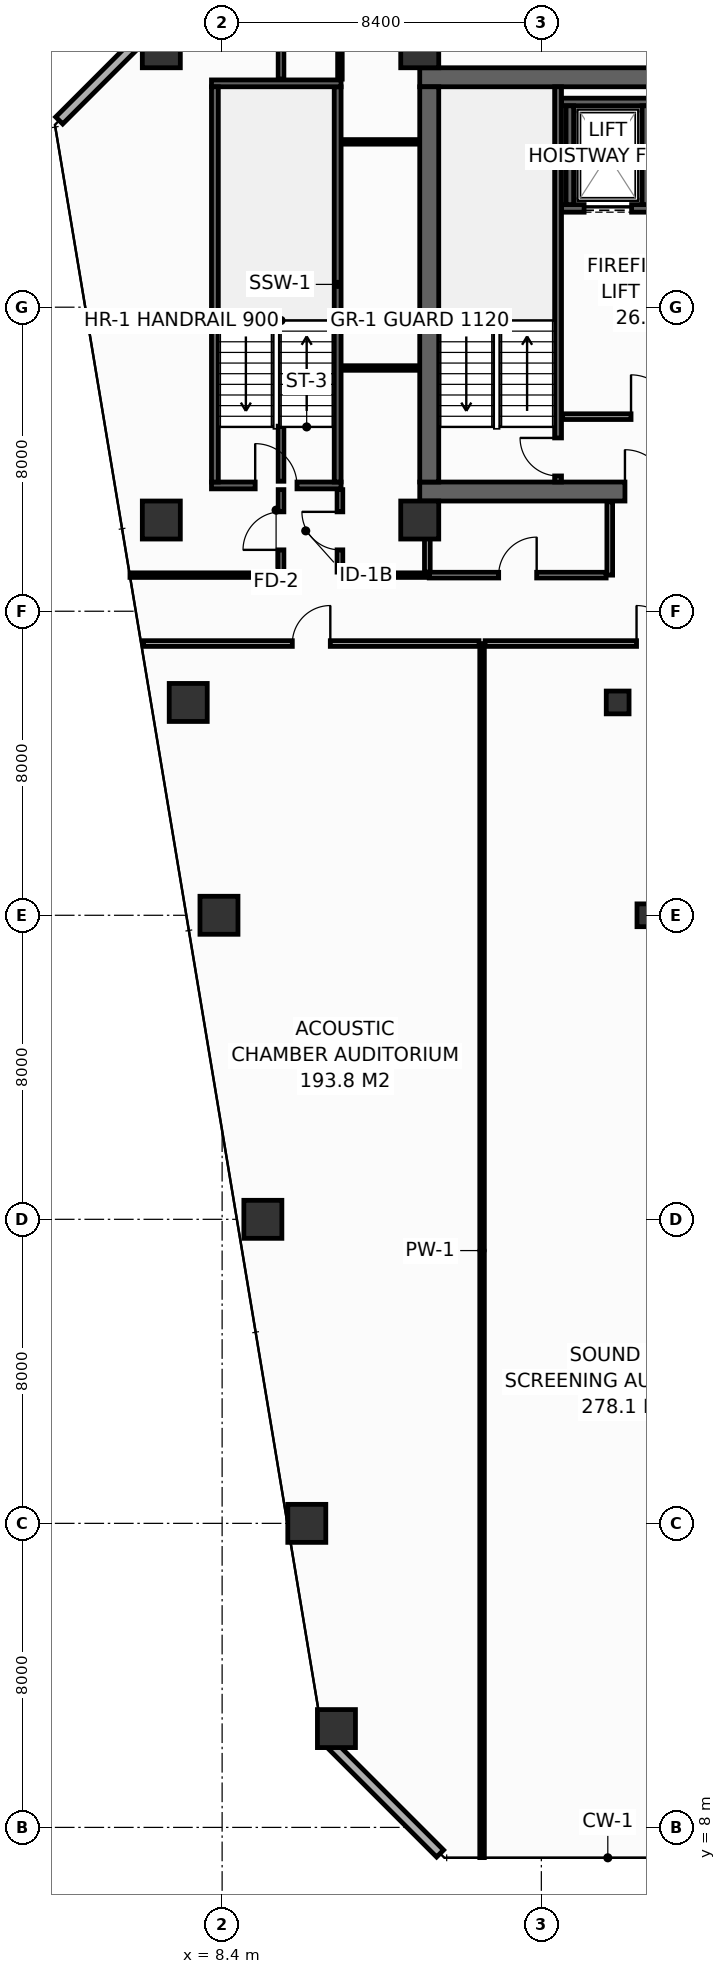
"""IFC4 building model, lengths in metres.
Left out: names, types, materials, properties, quantities, classifications, styles, units other than length and angle.
Written with IfcOpenShell. Run it as: python <this file> out.ifc"""

import sys

from ifc_helpers import new_model, si_unit, direction, frame, frame_2d, origin, origin_2d, place, context, subcontext, project, spatial, rectangle, hollow_rectangle, extrude, element, fill, save


model = new_model("IFC4")
c1 = context("Model", 3, precision=1e-05, world=origin(), true_north=direction((0.0, 1.0)))
c2 = subcontext(c1, "Body", "Model", "MODEL_VIEW")
j1 = project(units=[si_unit("LENGTHUNIT", "METRE"), si_unit("PLANEANGLEUNIT", "RADIAN")], contexts=[c1])
p1 = place(None, origin())
s1 = spatial("IfcSite", under=j1, at=p1, CompositionType="ELEMENT")
p2 = place(p1, origin())
s2 = spatial("IfcBuilding", under=s1, at=p2, CompositionType="ELEMENT")
p3 = place(p2, frame((0.0, 0.0, 141.0)))
s3 = spatial("IfcBuildingStorey", under=s2, at=p3, CompositionType="ELEMENT", Elevation=141.0)
p4 = place(p3, frame((13.6, 43.15, 0.0), z_axis=(0.0, 0.0, 1.0), x_axis=(1.0, 0.0, 0.0)))
e1 = element("IfcWall", 1, at=p4, inside=s3, PredefinedType="SHEAR", context=c2, shape_type="SweptSolid", body=[
    extrude(rectangle(XDim=32.7, YDim=0.5, at=frame_2d((16.35, 0.0))), origin(), (0.0, 0.0, 1.0), 3.55),
])
p5 = place(p4, frame((5.4, 0.0, 0.0)))
e2 = element("IfcOpeningElement", 2, at=p5, cuts=e1, PredefinedType="OPENING", context=c2, shape_type="SweptSolid", body=[
    extrude(rectangle(XDim=1.1, YDim=2.15, at=frame_2d((0.55, 1.075))), frame((0.0, 0.26, 0.0), z_axis=(0.0, -1.0, 0.0), x_axis=(1.0, 0.0, 0.0)), (0.0, 0.0, 1.0), 0.52),
])
p6 = place(p4, frame((25.6, 0.0, 0.0)))
e3 = element("IfcOpeningElement", 3, at=p6, cuts=e1, PredefinedType="OPENING", context=c2, shape_type="SweptSolid", body=[
    extrude(rectangle(XDim=1.1, YDim=2.15, at=frame_2d((0.55, 1.075))), frame((0.0, 0.26, 0.0), z_axis=(0.0, -1.0, 0.0), x_axis=(1.0, 0.0, 0.0)), (0.0, 0.0, 1.0), 0.52),
])
p7 = place(p3, frame((13.6, 54.05, 0.0), z_axis=(0.0, 0.0, 1.0), x_axis=(1.0, 0.0, 0.0)))
e4 = element("IfcWall", 4, at=p7, inside=s3, PredefinedType="SHEAR", context=c2, shape_type="SweptSolid", body=[
    extrude(rectangle(XDim=32.7, YDim=0.5, at=frame_2d((16.35, 0.0))), origin(), (0.0, 0.0, 1.0), 3.55),
])
p8 = place(p3, frame((13.85, 43.4, 0.0), z_axis=(0.0, 0.0, 1.0), x_axis=(0.0, 1.0, 0.0)))
e5 = element("IfcWall", 5, at=p8, inside=s3, PredefinedType="SHEAR", context=c2, shape_type="SweptSolid", body=[
    extrude(rectangle(XDim=10.4, YDim=0.5, at=frame_2d((5.2, 0.0))), origin(), (0.0, 0.0, 1.0), 3.55),
])
for number, where, z_axis, x_axis in (
    (6, (6.8, 54.8, 0.0), (0.0, 0.0, 1.0), (1.0, 0.0, 0.0)),
    (7, (13.6, 54.8, 0.0), (0.0, 0.0, 1.0), (1.0, 0.0, 0.0)),
    (8, (6.8, 42.4, 0.0), (0.0, 0.0, 1.0), (1.0, 0.0, 0.0)),
    (9, (13.6, 42.4, 0.0), (0.0, 0.0, 1.0), (1.0, 0.0, 0.0)),
    (10, (11.408, 10.6, 0.0), (0.0, 0.0, 1.0), (1.0, 0.0, 0.0)),
    (11, (10.628, 16.0, 0.0), (0.0, 0.0, 1.0), (1.0, 0.0, 0.0)),
    (12, (9.472, 24.0, 0.0), (0.0, 0.0, 1.0), (1.0, 0.0, 0.0)),
    (13, (8.317, 32.0, 0.0), (0.0, 0.0, 1.0), (1.0, 0.0, 0.0)),
):
    element("IfcColumn", number, at=place(p3, frame(where, z_axis=z_axis, x_axis=x_axis)), inside=s3, PredefinedType="COLUMN", context=c2, shape_type="SweptSolid", body=[
        extrude(hollow_rectangle(XDim=1.0, YDim=1.0, WallThickness=0.045, at=origin_2d()), origin(), (0.0, 0.0, 1.0), 3.8),
    ])
p9 = place(p3, frame((19.617, 32.0, 0.0), z_axis=(0.0, 0.0, 1.0), x_axis=(1.0, 0.0, 0.0)))
e14 = element("IfcColumn", 14, at=p9, inside=s3, PredefinedType="COLUMN", context=c2, shape_type="SweptSolid", body=[
    extrude(hollow_rectangle(XDim=0.6, YDim=0.6, WallThickness=0.028, at=origin_2d()), origin(), (0.0, 0.0, 1.0), 3.8),
])
p10 = place(p3, frame((7.508, 37.6, 0.0), z_axis=(0.0, 0.0, 1.0), x_axis=(1.0, 0.0, 0.0)))
e15 = element("IfcColumn", 15, at=p10, inside=s3, PredefinedType="COLUMN", context=c2, shape_type="SweptSolid", body=[
    extrude(hollow_rectangle(XDim=1.0, YDim=1.0, WallThickness=0.045, at=origin_2d()), origin(), (0.0, 0.0, 1.0), 3.8),
])
p11 = place(p3, frame((18.808, 37.6, 0.0), z_axis=(0.0, 0.0, 1.0), x_axis=(1.0, 0.0, 0.0)))
e16 = element("IfcColumn", 16, at=p11, inside=s3, PredefinedType="COLUMN", context=c2, shape_type="SweptSolid", body=[
    extrude(hollow_rectangle(XDim=0.6, YDim=0.6, WallThickness=0.028, at=origin_2d()), origin(), (0.0, 0.0, 1.0), 3.8),
])
p12 = place(p3, frame((17.33, 50.6, 0.0), z_axis=(0.0, 0.0, 1.0), x_axis=(1.0, 0.0, 0.0)))
e17 = element("IfcWall", 17, at=p12, inside=s3, PredefinedType="SHEAR", context=c2, shape_type="SweptSolid", body=[
    extrude(rectangle(XDim=2.52, YDim=0.2, at=frame_2d((1.26, 0.0))), origin(), (0.0, 0.0, 1.0), 3.55),
])
p13 = place(p12, frame((0.595, 0.0, 0.0)))
e18 = element("IfcOpeningElement", 18, at=p13, cuts=e17, PredefinedType="OPENING", context=c2, shape_type="SweptSolid", body=[
    extrude(rectangle(XDim=1.25, YDim=2.3, at=frame_2d((0.625, 1.15))), frame((0.0, 0.11, 0.0), z_axis=(0.0, -1.0, 0.0), x_axis=(1.0, 0.0, 0.0)), (0.0, 0.0, 1.0), 0.22),
])
p14 = place(p3, frame((17.33, 53.4, 0.0), z_axis=(0.0, 0.0, 1.0), x_axis=(1.0, 0.0, 0.0)))
e19 = element("IfcWall", 19, at=p14, inside=s3, PredefinedType="SHEAR", context=c2, shape_type="SweptSolid", body=[
    extrude(rectangle(XDim=2.52, YDim=0.2, at=frame_2d((1.26, 0.0))), origin(), (0.0, 0.0, 1.0), 3.55),
])
for number, where, z_axis, x_axis in (
    (20, (17.55, 50.7, 0.0), (0.0, 0.0, 1.0), (0.0, 1.0, 0.0)),
    (21, (19.55, 50.7, 0.0), (0.0, 0.0, 1.0), (0.0, 1.0, 0.0)),
):
    element("IfcWall", number, at=place(p3, frame(where, z_axis=z_axis, x_axis=x_axis)), inside=s3, PredefinedType="SHEAR", context=c2, shape_type="SweptSolid", body=[
        extrude(rectangle(XDim=2.6, YDim=0.2, at=frame_2d((1.3, 0.0))), origin(), (0.0, 0.0, 1.0), 3.55),
    ])
p15 = place(p3, frame((17.24, 43.4, 0.0), z_axis=(0.0, 0.0, 1.0), x_axis=(0.0, 1.0, 0.0)))
e22 = element("IfcWall", 22, at=p15, inside=s3, PredefinedType="SHEAR", context=c2, shape_type="SweptSolid", body=[
    extrude(rectangle(XDim=10.4, YDim=0.18, at=frame_2d((5.2, 0.0))), origin(), (0.0, 0.0, 1.0), 3.55),
])
p16 = place(p15, frame((0.16, 0.0, 0.0)))
e23 = element("IfcOpeningElement", 23, at=p16, cuts=e22, PredefinedType="OPENING", context=c2, shape_type="SweptSolid", body=[
    extrude(rectangle(XDim=1.0, YDim=2.15, at=frame_2d((0.5, 1.075))), frame((0.0, 0.1, 0.0), z_axis=(0.0, -1.0, 0.0), x_axis=(1.0, 0.0, 0.0)), (0.0, 0.0, 1.0), 0.2),
])
p17 = place(p3, frame((8.12, 43.31, 0.0), z_axis=(0.0, 0.0, 1.0), x_axis=(1.0, 0.0, 0.0)))
e24 = element("IfcWall", 24, at=p17, inside=s3, PredefinedType="SHEAR", context=c2, shape_type="SweptSolid", body=[
    extrude(rectangle(XDim=3.41, YDim=0.18, at=frame_2d((1.705, 0.0))), origin(), (0.0, 0.0, 1.0), 3.55),
])
p18 = place(p17, frame((1.15, 0.0, 0.0)))
e25 = element("IfcOpeningElement", 25, at=p18, cuts=e24, PredefinedType="OPENING", context=c2, shape_type="SweptSolid", body=[
    extrude(rectangle(XDim=1.1, YDim=2.15, at=frame_2d((0.55, 1.075))), frame((0.0, 0.1, 0.0), z_axis=(0.0, -1.0, 0.0), x_axis=(1.0, 0.0, 0.0)), (0.0, 0.0, 1.0), 0.2),
])
p19 = place(p3, frame((11.44, 43.4, 0.0), z_axis=(0.0, 0.0, 1.0), x_axis=(0.0, 1.0, 0.0)))
e26 = element("IfcWall", 26, at=p19, inside=s3, PredefinedType="SHEAR", context=c2, shape_type="SweptSolid", body=[
    extrude(rectangle(XDim=10.4, YDim=0.18, at=frame_2d((5.2, 0.0))), origin(), (0.0, 0.0, 1.0), 3.55),
])
p20 = place(p3, frame((11.53, 53.89, 0.0), z_axis=(0.0, 0.0, 1.0), x_axis=(-1.0, 0.0, 0.0)))
e27 = element("IfcWall", 27, at=p20, inside=s3, PredefinedType="SHEAR", context=c2, shape_type="SweptSolid", body=[
    extrude(rectangle(XDim=3.41, YDim=0.18, at=frame_2d((1.705, 0.0))), origin(), (0.0, 0.0, 1.0), 3.55),
])
p21 = place(p3, frame((8.21, 53.8, 0.0), z_axis=(0.0, 0.0, 1.0), x_axis=(0.0, -1.0, 0.0)))
e28 = element("IfcWall", 28, at=p21, inside=s3, PredefinedType="SHEAR", context=c2, shape_type="SweptSolid", body=[
    extrude(rectangle(XDim=10.4, YDim=0.18, at=frame_2d((5.2, 0.0))), origin(), (0.0, 0.0, 1.0), 3.55),
])
p22 = place(p3, frame((17.36, 45.12, 0.0), z_axis=(0.0, 0.0, 1.0), x_axis=(1.0, 0.0, 0.0)))
e29 = element("IfcWall", 29, at=p22, inside=s3, PredefinedType="PARTITIONING", context=c2, shape_type="SweptSolid", body=[
    extrude(rectangle(XDim=5.14, YDim=0.15, at=frame_2d((2.57, 0.0))), origin(), (0.0, 0.0, 1.0), 3.55),
])
p23 = place(p22, frame((1.8, 0.0, 0.0)))
e30 = element("IfcOpeningElement", 30, at=p23, cuts=e29, PredefinedType="OPENING", context=c2, shape_type="SweptSolid", body=[
    extrude(rectangle(XDim=1.1, YDim=2.15, at=frame_2d((0.55, 1.075))), frame((0.0, 0.085, 0.0), z_axis=(0.0, -1.0, 0.0), x_axis=(1.0, 0.0, 0.0)), (0.0, 0.0, 1.0), 0.17),
])
p24 = place(p3, frame((11.162, 10.287, 0.0), z_axis=(0.0, 0.0, 1.0), x_axis=(0.70707775441, -0.707135806771, 0.0)))
e31 = element("IfcWall", 31, at=p24, inside=s3, PredefinedType="STANDARD", context=c2, shape_type="SweptSolid", body=[
    extrude(rectangle(XDim=4.206, YDim=0.26, at=frame_2d((2.103, 0.0))), origin(), (0.0, 0.0, 1.0), 3.55),
])
p25 = place(p3, frame((7.087, 55.887, 0.0), z_axis=(0.0, 0.0, 1.0), x_axis=(-0.707106781187, -0.707106781187, 0.0)))
e32 = element("IfcWall", 32, at=p25, inside=s3, PredefinedType="STANDARD", context=c2, shape_type="SweptSolid", body=[
    extrude(rectangle(XDim=4.206, YDim=0.26, at=frame_2d((2.103, 0.0))), origin(), (0.0, 0.0, 1.0), 3.55),
])
p26 = place(p3, frame((5.975, 40.95, 0.0), z_axis=(0.0, 0.0, 1.0), x_axis=(1.0, 0.0, 0.0)))
e33 = element("IfcWall", 33, at=p26, inside=s3, PredefinedType="PARTITIONING", context=c2, shape_type="SweptSolid", body=[
    extrude(rectangle(XDim=3.975, YDim=0.12, at=frame_2d((1.987, 0.0))), origin(), (0.0, 0.0, 1.0), 3.035),
])
p27 = place(p3, frame((11.5, 40.95, 0.0), z_axis=(0.0, 0.0, 1.0), x_axis=(1.0, 0.0, 0.0)))
e34 = element("IfcWall", 34, at=p27, inside=s3, PredefinedType="PARTITIONING", context=c2, shape_type="SweptSolid", body=[
    extrude(rectangle(XDim=2.35, YDim=0.12, at=frame_2d((1.175, 0.0))), origin(), (0.0, 0.0, 1.0), 3.55),
])
p28 = place(p3, frame((11.55, 52.35, 0.0), z_axis=(0.0, 0.0, 1.0), x_axis=(1.0, 0.0, 0.0)))
e35 = element("IfcWall", 35, at=p28, inside=s3, PredefinedType="PARTITIONING", context=c2, shape_type="SweptSolid", body=[
    extrude(rectangle(XDim=2.03, YDim=0.12, at=frame_2d((1.015, 0.0))), origin(), (0.0, 0.0, 1.0), 3.55),
])
p29 = place(p3, frame((11.5, 54.0, 0.0), z_axis=(0.0, 0.0, 1.0), x_axis=(0.0, 1.0, 0.0)))
e36 = element("IfcWall", 36, at=p29, inside=s3, PredefinedType="PARTITIONING", context=c2, shape_type="SweptSolid", body=[
    extrude(rectangle(XDim=1.995, YDim=0.12, at=frame_2d((0.998, 0.0))), origin(), (0.0, 0.0, 1.0), 2.935),
])
p30 = place(p3, frame((4.87, 47.6, 0.0), z_axis=(0.0, 0.0, 1.0), x_axis=(1.0, 0.0, 0.0)))
e37 = element("IfcWall", 37, at=p30, inside=s3, PredefinedType="PARTITIONING", context=c2, shape_type="SweptSolid", body=[
    extrude(rectangle(XDim=3.23, YDim=0.12, at=frame_2d((1.615, 0.0))), origin(), (0.0, 0.0, 1.0), 2.835),
])
p31 = place(p3, frame((9.95, 41.03, 0.0), z_axis=(0.0, 0.0, 1.0), x_axis=(0.0, 1.0, 0.0)))
e38 = element("IfcWall", 38, at=p31, inside=s3, PredefinedType="PARTITIONING", context=c2, shape_type="SweptSolid", body=[
    extrude(rectangle(XDim=2.17, YDim=0.15, at=frame_2d((1.085, 0.0))), origin(), (0.0, 0.0, 1.0), 2.835),
])
p32 = place(p31, frame((0.585, 0.0, 0.0)))
e39 = element("IfcOpeningElement", 39, at=p32, cuts=e38, PredefinedType="OPENING", context=c2, shape_type="SweptSolid", body=[
    extrude(rectangle(XDim=1.0, YDim=2.15, at=frame_2d((0.5, 1.075))), frame((0.0, 0.085, 0.0), z_axis=(0.0, -1.0, 0.0), x_axis=(1.0, 0.0, 0.0)), (0.0, 0.0, 1.0), 0.17),
])
p33 = place(p3, frame((9.95, 43.42, 0.0), z_axis=(0.0, 0.0, 1.0), x_axis=(0.0, 1.0, 0.0)))
e40 = element("IfcWall", 40, at=p33, inside=s3, PredefinedType="PARTITIONING", context=c2, shape_type="SweptSolid", body=[
    extrude(rectangle(XDim=1.45, YDim=0.15, at=frame_2d((0.725, 0.0))), origin(), (0.0, 0.0, 1.0), 3.55),
])
p34 = place(p3, frame((9.95, 54.0, 0.0), z_axis=(0.0, 0.0, 1.0), x_axis=(0.0, 1.0, 0.0)))
e41 = element("IfcWall", 41, at=p34, inside=s3, PredefinedType="PARTITIONING", context=c2, shape_type="SweptSolid", body=[
    extrude(rectangle(XDim=1.995, YDim=0.15, at=frame_2d((0.998, 0.0))), origin(), (0.0, 0.0, 1.0), 2.935),
])
p35 = place(p3, frame((11.55, 46.4, 0.0), z_axis=(0.0, 0.0, 1.0), x_axis=(1.0, 0.0, 0.0)))
e42 = element("IfcWall", 42, at=p35, inside=s3, PredefinedType="PARTITIONING", context=c2, shape_type="SweptSolid", body=[
    extrude(rectangle(XDim=2.03, YDim=0.12, at=frame_2d((1.015, 0.0))), origin(), (0.0, 0.0, 1.0), 3.55),
])
p36 = place(p3, frame((11.5, 41.03, 0.0), z_axis=(0.0, 0.0, 1.0), x_axis=(0.0, 1.0, 0.0)))
e43 = element("IfcWall", 43, at=p36, inside=s3, PredefinedType="PARTITIONING", context=c2, shape_type="SweptSolid", body=[
    extrude(rectangle(XDim=2.17, YDim=0.15, at=frame_2d((1.085, 0.0))), origin(), (0.0, 0.0, 1.0), 2.835),
])
p37 = place(p36, frame((0.585, 0.0, 0.0)))
e44 = element("IfcOpeningElement", 44, at=p37, cuts=e43, PredefinedType="OPENING", context=c2, shape_type="SweptSolid", body=[
    extrude(rectangle(XDim=1.0, YDim=2.15, at=frame_2d((0.5, 1.075))), frame((0.0, 0.085, 0.0), z_axis=(0.0, -1.0, 0.0), x_axis=(1.0, 0.0, 0.0)), (0.0, 0.0, 1.0), 0.17),
])
p38 = place(p3, frame((13.8, 41.03, 0.0), z_axis=(0.0, 0.0, 1.0), x_axis=(0.0, 1.0, 0.0)))
e45 = element("IfcWall", 45, at=p38, inside=s3, PredefinedType="PARTITIONING", context=c2, shape_type="SweptSolid", body=[
    extrude(rectangle(XDim=1.85, YDim=0.15, at=frame_2d((0.925, 0.0))), origin(), (0.0, 0.0, 1.0), 3.55),
])
p39 = place(p3, frame((18.6, 40.95, 0.0), z_axis=(0.0, 0.0, 1.0), x_axis=(0.0, 1.0, 0.0)))
e46 = element("IfcWall", 46, at=p39, inside=s3, PredefinedType="PARTITIONING", context=c2, shape_type="SweptSolid", body=[
    extrude(rectangle(XDim=1.93, YDim=0.15, at=frame_2d((0.965, 0.0))), origin(), (0.0, 0.0, 1.0), 3.55),
])
p40 = place(p3, frame((13.85, 40.95, 0.0), z_axis=(0.0, 0.0, 1.0), x_axis=(1.0, 0.0, 0.0)))
e47 = element("IfcWall", 47, at=p40, inside=s3, PredefinedType="PARTITIONING", context=c2, shape_type="SweptSolid", body=[
    extrude(rectangle(XDim=4.655, YDim=0.15, at=frame_2d((2.327, 0.0))), origin(), (0.0, 0.0, 1.0), 3.55),
])
p41 = place(p40, frame((1.827, 0.0, 0.0)))
e48 = element("IfcOpeningElement", 48, at=p41, cuts=e47, PredefinedType="OPENING", context=c2, shape_type="SweptSolid", body=[
    extrude(rectangle(XDim=1.0, YDim=2.15, at=frame_2d((0.5, 1.075))), frame((0.0, 0.085, 0.0), z_axis=(0.0, -1.0, 0.0), x_axis=(1.0, 0.0, 0.0)), (0.0, 0.0, 1.0), 0.17),
])
p42 = place(p3, frame((15.24, 7.205, 0.0), z_axis=(0.0, 0.0, 1.0), x_axis=(0.0, 1.0, 0.0)))
e49 = element("IfcWall", 49, at=p42, inside=s3, PredefinedType="PARTITIONING", context=c2, shape_type="SweptSolid", body=[
    extrude(rectangle(XDim=31.945, YDim=0.12, at=frame_2d((15.972, 0.0))), origin(), (0.0, 0.0, 1.0), 2.835),
])
p43 = place(p3, frame((6.334, 39.15, 0.0), z_axis=(0.0, 0.0, 1.0), x_axis=(1.0, 0.0, 0.0)))
e50 = element("IfcWall", 50, at=p43, inside=s3, PredefinedType="PARTITIONING", context=c2, shape_type="SweptSolid", body=[
    extrude(rectangle(XDim=8.826, YDim=0.15, at=frame_2d((4.413, 0.0))), origin(), (0.0, 0.0, 1.0), 3.035),
])
p44 = place(p43, frame((3.913, 0.0, 0.0)))
e51 = element("IfcOpeningElement", 51, at=p44, cuts=e50, PredefinedType="OPENING", context=c2, shape_type="SweptSolid", body=[
    extrude(rectangle(XDim=1.0, YDim=2.15, at=frame_2d((0.5, 1.075))), frame((0.0, 0.085, 0.0), z_axis=(0.0, -1.0, 0.0), x_axis=(1.0, 0.0, 0.0)), (0.0, 0.0, 1.0), 0.17),
])
p45 = place(p3, frame((15.32, 39.15, 0.0), z_axis=(0.0, 0.0, 1.0), x_axis=(1.0, 0.0, 0.0)))
e52 = element("IfcWall", 52, at=p45, inside=s3, PredefinedType="PARTITIONING", context=c2, shape_type="SweptSolid", body=[
    extrude(rectangle(XDim=8.53, YDim=0.15, at=frame_2d((4.265, 0.0))), origin(), (0.0, 0.0, 1.0), 2.835),
])
p46 = place(p45, frame((3.985, 0.0, 0.0)))
e53 = element("IfcOpeningElement", 53, at=p46, cuts=e52, PredefinedType="OPENING", context=c2, shape_type="SweptSolid", body=[
    extrude(rectangle(XDim=1.0, YDim=2.15, at=frame_2d((0.5, 1.075))), frame((0.0, 0.085, 0.0), z_axis=(0.0, -1.0, 0.0), x_axis=(1.0, 0.0, 0.0)), (0.0, 0.0, 1.0), 0.17),
])
p47 = place(p13, origin())
e54 = element("IfcDoor", 54, at=p47, inside=s3, OperationType="SLIDING_TO_LEFT", PredefinedType="DOOR", context=c2, shape_type="SweptSolid", body=[
    extrude(rectangle(XDim=1.25, YDim=2.3, at=frame_2d((0.625, 1.15))), frame((0.0, 0.025, 0.0), z_axis=(0.0, -1.0, 0.0), x_axis=(1.0, 0.0, 0.0)), (0.0, 0.0, 1.0), 0.05),
])
fill(e18, e54)
p48 = place(p16, origin())
e55 = element("IfcDoor", 55, at=p48, inside=s3, OperationType="SINGLE_SWING_RIGHT", PredefinedType="DOOR", context=c2, shape_type="SweptSolid", body=[
    extrude(rectangle(XDim=1.0, YDim=2.15, at=frame_2d((0.5, 1.075))), frame((0.0, 0.025, 0.0), z_axis=(0.0, -1.0, 0.0), x_axis=(1.0, 0.0, 0.0)), (0.0, 0.0, 1.0), 0.05),
])
fill(e23, e55)
p49 = place(p18, origin())
e56 = element("IfcDoor", 56, at=p49, inside=s3, OperationType="SINGLE_SWING_LEFT", PredefinedType="DOOR", context=c2, shape_type="SweptSolid", body=[
    extrude(rectangle(XDim=1.1, YDim=2.15, at=frame_2d((0.55, 1.075))), frame((0.0, 0.025, 0.0), z_axis=(0.0, -1.0, 0.0), x_axis=(1.0, 0.0, 0.0)), (0.0, 0.0, 1.0), 0.05),
])
fill(e25, e56)
p50 = place(p23, origin())
e57 = element("IfcDoor", 57, at=p50, inside=s3, OperationType="SINGLE_SWING_LEFT", PredefinedType="DOOR", context=c2, shape_type="SweptSolid", body=[
    extrude(rectangle(XDim=1.1, YDim=2.15, at=frame_2d((0.55, 1.075))), frame((0.0, 0.025, 0.0), z_axis=(0.0, -1.0, 0.0), x_axis=(1.0, 0.0, 0.0)), (0.0, 0.0, 1.0), 0.05),
])
fill(e30, e57)
p51 = place(p5, origin())
e58 = element("IfcDoor", 58, at=p51, inside=s3, OperationType="SINGLE_SWING_LEFT", PredefinedType="DOOR", context=c2, shape_type="SweptSolid", body=[
    extrude(rectangle(XDim=1.1, YDim=2.15, at=frame_2d((0.55, 1.075))), frame((0.0, 0.025, 0.0), z_axis=(0.0, -1.0, 0.0), x_axis=(1.0, 0.0, 0.0)), (0.0, 0.0, 1.0), 0.05),
])
fill(e2, e58)
p52 = place(p32, origin())
e59 = element("IfcDoor", 59, at=p52, inside=s3, OperationType="SINGLE_SWING_LEFT", PredefinedType="DOOR", context=c2, shape_type="SweptSolid", body=[
    extrude(rectangle(XDim=1.0, YDim=2.15, at=frame_2d((0.5, 1.075))), frame((0.0, 0.025, 0.0), z_axis=(0.0, -1.0, 0.0), x_axis=(1.0, 0.0, 0.0)), (0.0, 0.0, 1.0), 0.05),
])
fill(e39, e59)
p53 = place(p37, origin())
e60 = element("IfcDoor", 60, at=p53, inside=s3, OperationType="SINGLE_SWING_RIGHT", PredefinedType="DOOR", context=c2, shape_type="SweptSolid", body=[
    extrude(rectangle(XDim=1.0, YDim=2.15, at=frame_2d((0.5, 1.075))), frame((0.0, 0.025, 0.0), z_axis=(0.0, -1.0, 0.0), x_axis=(1.0, 0.0, 0.0)), (0.0, 0.0, 1.0), 0.05),
])
fill(e44, e60)
p54 = place(p41, origin())
e61 = element("IfcDoor", 61, at=p54, inside=s3, OperationType="SINGLE_SWING_RIGHT", PredefinedType="DOOR", context=c2, shape_type="SweptSolid", body=[
    extrude(rectangle(XDim=1.0, YDim=2.15, at=frame_2d((0.5, 1.075))), frame((0.0, 0.025, 0.0), z_axis=(0.0, -1.0, 0.0), x_axis=(1.0, 0.0, 0.0)), (0.0, 0.0, 1.0), 0.05),
])
fill(e48, e61)
p55 = place(p44, origin())
e62 = element("IfcDoor", 62, at=p55, inside=s3, OperationType="SINGLE_SWING_RIGHT", PredefinedType="DOOR", context=c2, shape_type="SweptSolid", body=[
    extrude(rectangle(XDim=1.0, YDim=2.15, at=frame_2d((0.5, 1.075))), frame((0.0, 0.025, 0.0), z_axis=(0.0, -1.0, 0.0), x_axis=(1.0, 0.0, 0.0)), (0.0, 0.0, 1.0), 0.05),
])
fill(e51, e62)
p56 = place(p46, origin())
e63 = element("IfcDoor", 63, at=p56, inside=s3, OperationType="SINGLE_SWING_LEFT", PredefinedType="DOOR", context=c2, shape_type="SweptSolid", body=[
    extrude(rectangle(XDim=1.0, YDim=2.15, at=frame_2d((0.5, 1.075))), frame((0.0, 0.025, 0.0), z_axis=(0.0, -1.0, 0.0), x_axis=(1.0, 0.0, 0.0)), (0.0, 0.0, 1.0), 0.05),
])
fill(e53, e63)
save(model, sys.argv[1])
